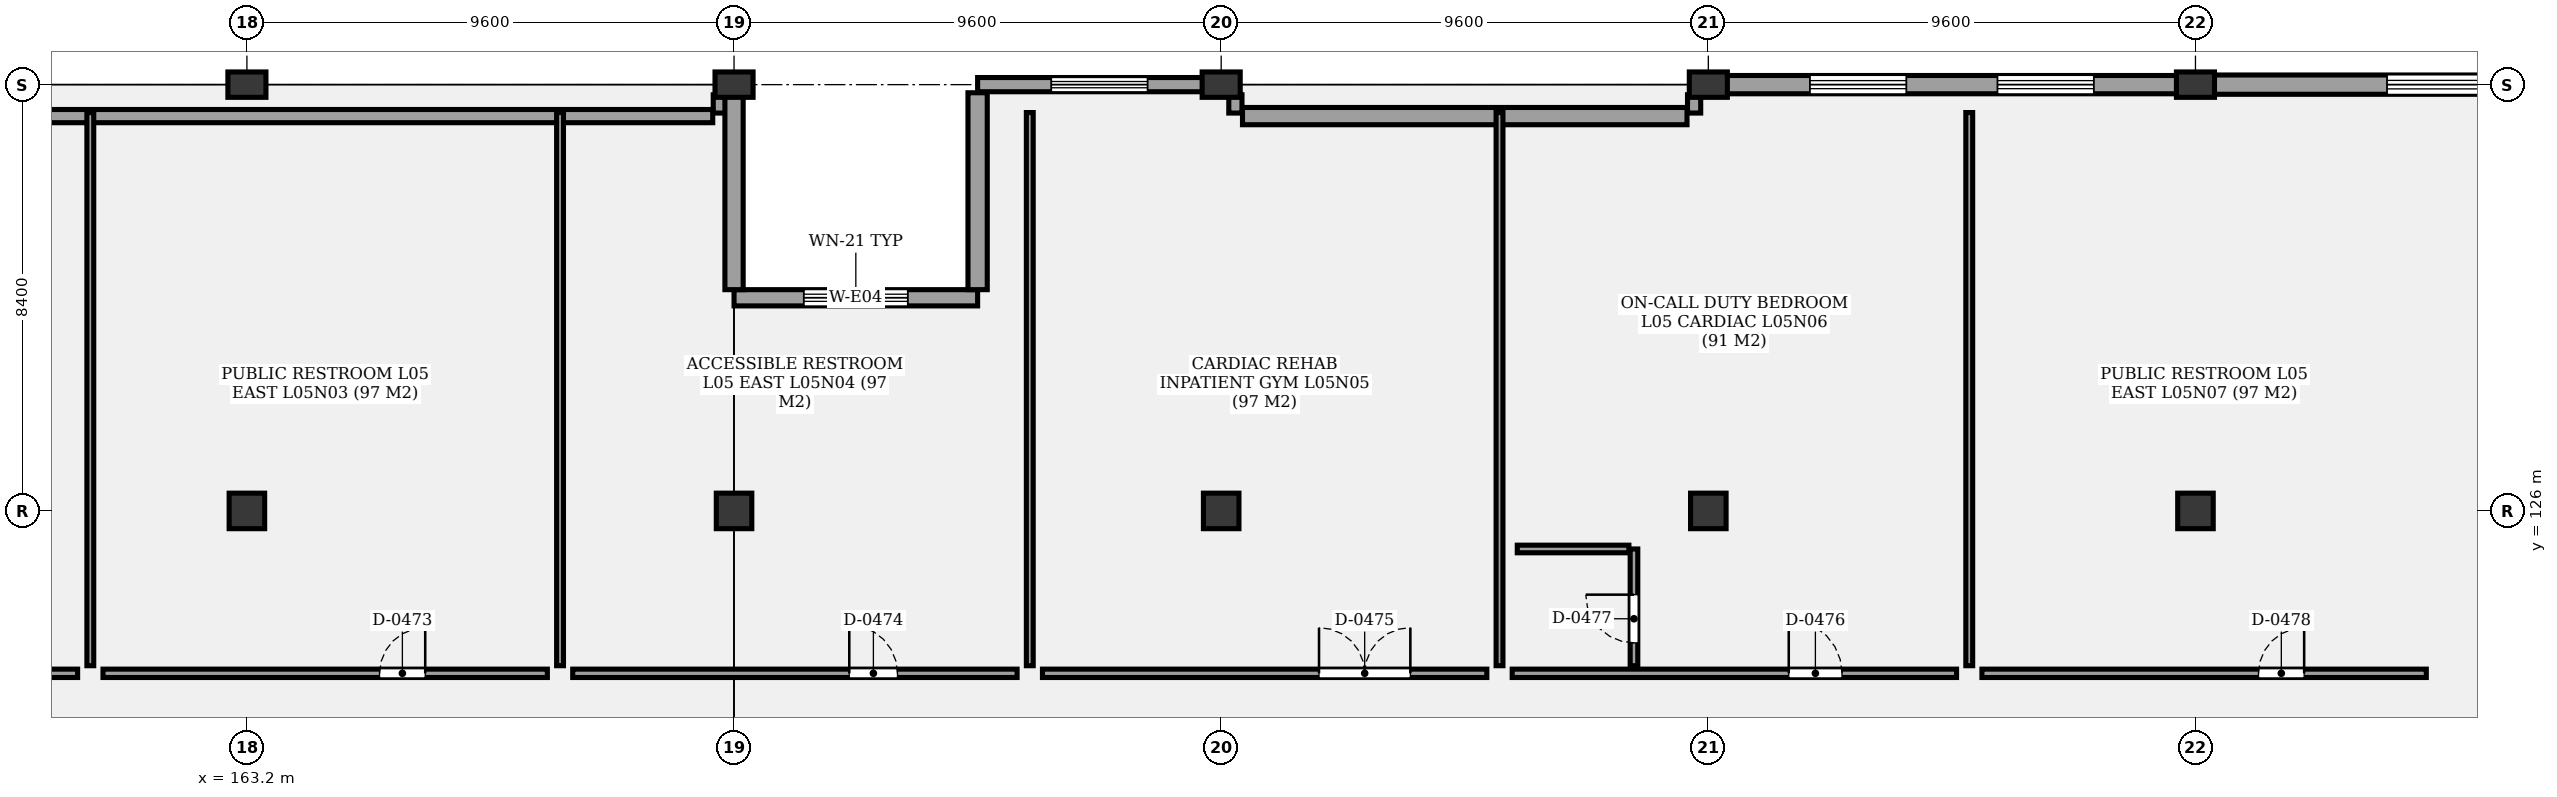
"""IFC4 building model, lengths in metres.
Left out: names, types, materials, properties, quantities, classifications, styles, units other than length and angle.
Written with IfcOpenShell. Run it as: python <this file> out.ifc"""

import sys

from ifc_helpers import new_model, si_unit, direction, frame, frame_2d, origin, origin_2d, place, context, subcontext, project, spatial, rectangle, extrude, element, fill, save


model = new_model("IFC4")
c1 = context("Model", 3, precision=1e-05, world=origin(), true_north=direction((0.0, 1.0)))
c2 = subcontext(c1, "Body", "Model", "MODEL_VIEW")
j1 = project(units=[si_unit("LENGTHUNIT", "METRE"), si_unit("PLANEANGLEUNIT", "RADIAN")], contexts=[c1])
p1 = place(None, origin())
s1 = spatial("IfcSite", under=j1, at=p1, CompositionType="ELEMENT")
p2 = place(p1, origin())
s2 = spatial("IfcBuilding", under=s1, at=p2, CompositionType="ELEMENT")
p3 = place(p2, frame((0.0, 0.0, 22.0)))
s3 = spatial("IfcBuildingStorey", under=s2, at=p3, CompositionType="ELEMENT", Elevation=22.0)
p4 = place(p3, frame((163.2, 126.0, 0.0), z_axis=(0.0, 0.0, 1.0), x_axis=(1.0, 0.0, 0.0)))
e1 = element("IfcColumn", 1, at=p4, inside=s3, PredefinedType="COLUMN", context=c2, shape_type="SweptSolid", body=[
    extrude(rectangle(XDim=0.7, YDim=0.7, at=origin_2d()), origin(), (0.0, 0.0, 1.0), 4.2),
])
p5 = place(p3, frame((163.2, 134.4, 0.0), z_axis=(0.0, 0.0, 1.0), x_axis=(1.0, 0.0, 0.0)))
e2 = element("IfcColumn", 2, at=p5, inside=s3, PredefinedType="COLUMN", context=c2, shape_type="SweptSolid", body=[
    extrude(rectangle(XDim=0.75, YDim=0.5, at=origin_2d()), origin(), (0.0, 0.0, 1.0), 4.2),
])
p6 = place(p3, frame((172.8, 126.0, 0.0), z_axis=(0.0, 0.0, 1.0), x_axis=(1.0, 0.0, 0.0)))
e3 = element("IfcColumn", 3, at=p6, inside=s3, PredefinedType="COLUMN", context=c2, shape_type="SweptSolid", body=[
    extrude(rectangle(XDim=0.7, YDim=0.7, at=origin_2d()), origin(), (0.0, 0.0, 1.0), 4.2),
])
p7 = place(p3, frame((172.8, 134.4, 0.0), z_axis=(0.0, 0.0, 1.0), x_axis=(1.0, 0.0, 0.0)))
e4 = element("IfcColumn", 4, at=p7, inside=s3, PredefinedType="COLUMN", context=c2, shape_type="SweptSolid", body=[
    extrude(rectangle(XDim=0.75, YDim=0.5, at=origin_2d()), origin(), (0.0, 0.0, 1.0), 4.2),
])
p8 = place(p3, frame((182.4, 126.0, 0.0), z_axis=(0.0, 0.0, 1.0), x_axis=(1.0, 0.0, 0.0)))
e5 = element("IfcColumn", 5, at=p8, inside=s3, PredefinedType="COLUMN", context=c2, shape_type="SweptSolid", body=[
    extrude(rectangle(XDim=0.7, YDim=0.7, at=origin_2d()), origin(), (0.0, 0.0, 1.0), 4.2),
])
p9 = place(p3, frame((182.4, 134.4, 0.0), z_axis=(0.0, 0.0, 1.0), x_axis=(1.0, 0.0, 0.0)))
e6 = element("IfcColumn", 6, at=p9, inside=s3, PredefinedType="COLUMN", context=c2, shape_type="SweptSolid", body=[
    extrude(rectangle(XDim=0.75, YDim=0.5, at=origin_2d()), origin(), (0.0, 0.0, 1.0), 4.2),
])
p10 = place(p3, frame((192.0, 126.0, 0.0), z_axis=(0.0, 0.0, 1.0), x_axis=(1.0, 0.0, 0.0)))
e7 = element("IfcColumn", 7, at=p10, inside=s3, PredefinedType="COLUMN", context=c2, shape_type="SweptSolid", body=[
    extrude(rectangle(XDim=0.7, YDim=0.7, at=origin_2d()), origin(), (0.0, 0.0, 1.0), 4.2),
])
p11 = place(p3, frame((192.0, 134.4, 0.0), z_axis=(0.0, 0.0, 1.0), x_axis=(1.0, 0.0, 0.0)))
e8 = element("IfcColumn", 8, at=p11, inside=s3, PredefinedType="COLUMN", context=c2, shape_type="SweptSolid", body=[
    extrude(rectangle(XDim=0.75, YDim=0.5, at=origin_2d()), origin(), (0.0, 0.0, 1.0), 4.2),
])
p12 = place(p3, frame((201.6, 126.0, 0.0), z_axis=(0.0, 0.0, 1.0), x_axis=(1.0, 0.0, 0.0)))
e9 = element("IfcColumn", 9, at=p12, inside=s3, PredefinedType="COLUMN", context=c2, shape_type="SweptSolid", body=[
    extrude(rectangle(XDim=0.7, YDim=0.7, at=origin_2d()), origin(), (0.0, 0.0, 1.0), 4.2),
])
p13 = place(p3, frame((201.6, 134.4, 0.0), z_axis=(0.0, 0.0, 1.0), x_axis=(1.0, 0.0, 0.0)))
e10 = element("IfcColumn", 10, at=p13, inside=s3, PredefinedType="COLUMN", context=c2, shape_type="SweptSolid", body=[
    extrude(rectangle(XDim=0.75, YDim=0.5, at=origin_2d()), origin(), (0.0, 0.0, 1.0), 4.2),
])
p14 = place(p3, frame((172.8, 130.2, 0.0), z_axis=(0.0, 0.0, 1.0), x_axis=(1.0, 0.0, 0.0)))
e11 = element("IfcWall", 11, at=p14, inside=s3, PredefinedType="SOLIDWALL", context=c2, shape_type="SweptSolid", body=[
    extrude(rectangle(XDim=4.8, YDim=0.32, at=frame_2d((2.4, 0.0))), origin(), (0.0, 0.0, 1.0), 3.39),
])
p15 = place(p14, frame((1.375, 0.0, 0.85)))
e12 = element("IfcOpeningElement", 12, at=p15, cuts=e11, PredefinedType="OPENING", context=c2, shape_type="SweptSolid", body=[
    extrude(rectangle(XDim=2.05, YDim=1.4, at=frame_2d((1.025, 0.7))), frame((0.0, 0.17, 0.0), z_axis=(0.0, -1.0, 0.0), x_axis=(1.0, 0.0, 0.0)), (0.0, 0.0, 1.0), 0.34),
])
p16 = place(p3, frame((172.52, 134.2, 0.0), z_axis=(0.0, 0.0, 1.0), x_axis=(0.0, -1.0, 0.0)))
e13 = element("IfcWall", 13, at=p16, inside=s3, PredefinedType="SOLIDWALL", context=c2, shape_type="SweptSolid", body=[
    extrude(rectangle(XDim=0.36, YDim=0.26, at=frame_2d((0.18, 0.0))), origin(), (0.0, 0.0, 1.0), 3.39),
])
p17 = place(p3, frame((154.02, 133.78, 0.0), z_axis=(0.0, 0.0, 1.0), x_axis=(1.0, 0.0, 0.0)))
e14 = element("IfcWall", 14, at=p17, inside=s3, PredefinedType="SOLIDWALL", context=c2, shape_type="SweptSolid", body=[
    extrude(rectangle(XDim=18.36, YDim=0.26, at=frame_2d((9.18, 0.0))), origin(), (0.0, 0.0, 1.0), 3.39),
])
p18 = place(p3, frame((177.6, 134.4, 0.0), z_axis=(0.0, 0.0, 1.0), x_axis=(1.0, 0.0, 0.0)))
e15 = element("IfcWall", 15, at=p18, inside=s3, PredefinedType="SOLIDWALL", context=c2, shape_type="SweptSolid", body=[
    extrude(rectangle(XDim=4.8, YDim=0.28, at=frame_2d((2.4, 0.0))), origin(), (0.0, 0.0, 1.0), 3.39),
])
p19 = place(p18, frame((1.45, 0.0, 0.85)))
e16 = element("IfcOpeningElement", 16, at=p19, cuts=e15, PredefinedType="OPENING", context=c2, shape_type="SweptSolid", body=[
    extrude(rectangle(XDim=1.9, YDim=1.4, at=frame_2d((0.95, 0.7))), frame((0.0, 0.15, 0.0), z_axis=(0.0, -1.0, 0.0), x_axis=(1.0, 0.0, 0.0)), (0.0, 0.0, 1.0), 0.3),
])
for number, where, z_axis, x_axis in (
    (17, (182.68, 134.2, 0.0), (0.0, 0.0, 1.0), (0.0, -1.0, 0.0)),
    (18, (191.72, 134.2, 0.0), (0.0, 0.0, 1.0), (0.0, -1.0, 0.0)),
):
    element("IfcWall", number, at=place(p3, frame(where, z_axis=z_axis, x_axis=x_axis)), inside=s3, PredefinedType="SOLIDWALL", context=c2, shape_type="SweptSolid", body=[
        extrude(rectangle(XDim=0.36, YDim=0.26, at=frame_2d((0.18, 0.0))), origin(), (0.0, 0.0, 1.0), 3.39),
    ])
p20 = place(p3, frame((182.82, 133.78, 0.0), z_axis=(0.0, 0.0, 1.0), x_axis=(1.0, 0.0, 0.0)))
e19 = element("IfcWall", 19, at=p20, inside=s3, PredefinedType="SOLIDWALL", context=c2, shape_type="SweptSolid", body=[
    extrude(rectangle(XDim=8.76, YDim=0.34, at=frame_2d((4.38, 0.0))), origin(), (0.0, 0.0, 1.0), 3.39),
])
p21 = place(p3, frame((192.0, 134.4, 0.0), z_axis=(0.0, 0.0, 1.0), x_axis=(1.0, 0.0, 0.0)))
e20 = element("IfcWall", 20, at=p21, inside=s3, PredefinedType="SOLIDWALL", context=c2, shape_type="SweptSolid", body=[
    extrude(rectangle(XDim=9.6, YDim=0.36, at=frame_2d((4.8, 0.0))), origin(), (0.0, 0.0, 1.0), 3.39),
])
p22 = place(p21, frame((2.002, 0.0, 0.85)))
e21 = element("IfcOpeningElement", 21, at=p22, cuts=e20, PredefinedType="OPENING", context=c2, shape_type="SweptSolid", body=[
    extrude(rectangle(XDim=1.9, YDim=1.4, at=frame_2d((0.95, 0.7))), frame((0.0, 0.19, 0.0), z_axis=(0.0, -1.0, 0.0), x_axis=(1.0, 0.0, 0.0)), (0.0, 0.0, 1.0), 0.38),
])
p23 = place(p21, frame((5.698, 0.0, 0.85)))
e22 = element("IfcOpeningElement", 22, at=p23, cuts=e20, PredefinedType="OPENING", context=c2, shape_type="SweptSolid", body=[
    extrude(rectangle(XDim=1.9, YDim=1.4, at=frame_2d((0.95, 0.7))), frame((0.0, 0.19, 0.0), z_axis=(0.0, -1.0, 0.0), x_axis=(1.0, 0.0, 0.0)), (0.0, 0.0, 1.0), 0.38),
])
p24 = place(p3, frame((201.6, 134.4, 0.0), z_axis=(0.0, 0.0, 1.0), x_axis=(1.0, 0.0, 0.0)))
e23 = element("IfcWall", 23, at=p24, inside=s3, PredefinedType="SOLIDWALL", context=c2, shape_type="SweptSolid", body=[
    extrude(rectangle(XDim=9.6, YDim=0.38, at=frame_2d((4.8, 0.0))), origin(), (0.0, 0.0, 1.0), 3.39),
])
p25 = place(p24, frame((3.775, 0.0, 0.85)))
e24 = element("IfcOpeningElement", 24, at=p25, cuts=e23, PredefinedType="OPENING", context=c2, shape_type="SweptSolid", body=[
    extrude(rectangle(XDim=2.05, YDim=1.4, at=frame_2d((1.025, 0.7))), frame((0.0, 0.2, 0.0), z_axis=(0.0, -1.0, 0.0), x_axis=(1.0, 0.0, 0.0)), (0.0, 0.0, 1.0), 0.4),
])
p26 = place(p3, frame((172.8, 134.24, 0.0), z_axis=(0.0, 0.0, 1.0), x_axis=(0.0, -1.0, 0.0)))
e25 = element("IfcWall", 25, at=p26, inside=s3, PredefinedType="SOLIDWALL", context=c2, shape_type="SweptSolid", body=[
    extrude(rectangle(XDim=3.88, YDim=0.36, at=frame_2d((1.94, 0.0))), origin(), (0.0, 0.0, 1.0), 3.39),
])
p27 = place(p3, frame((177.6, 130.36, 0.0), z_axis=(0.0, 0.0, 1.0), x_axis=(0.0, 1.0, 0.0)))
e26 = element("IfcWall", 26, at=p27, inside=s3, PredefinedType="SOLIDWALL", context=c2, shape_type="SweptSolid", body=[
    extrude(rectangle(XDim=3.88, YDim=0.38, at=frame_2d((1.94, 0.0))), origin(), (0.0, 0.0, 1.0), 3.39),
])
p28 = place(p3, frame((151.107, 122.8, 0.0), z_axis=(0.0, 0.0, 1.0), x_axis=(1.0, 0.0, 0.0)))
e27 = element("IfcWall", 27, at=p28, inside=s3, PredefinedType="PARTITIONING", context=c2, shape_type="SweptSolid", body=[
    extrude(rectangle(XDim=8.757, YDim=0.165, at=frame_2d((4.378, 0.0))), origin(), (0.0, 0.0, 1.0), 3.3),
])
p29 = place(p28, frame((5.45, 0.0, 0.0)))
e28 = element("IfcOpeningElement", 28, at=p29, cuts=e27, PredefinedType="OPENING", context=c2, shape_type="SweptSolid", body=[
    extrude(rectangle(XDim=1.05, YDim=2.2, at=frame_2d((0.525, 1.1))), frame((0.0, 0.093, 0.0), z_axis=(0.0, -1.0, 0.0), x_axis=(1.0, 0.0, 0.0)), (0.0, 0.0, 1.0), 0.185),
])
p30 = place(p3, frame((160.364, 122.8, 0.0), z_axis=(0.0, 0.0, 1.0), x_axis=(1.0, 0.0, 0.0)))
e29 = element("IfcWall", 29, at=p30, inside=s3, PredefinedType="PARTITIONING", context=c2, shape_type="SweptSolid", body=[
    extrude(rectangle(XDim=8.757, YDim=0.165, at=frame_2d((4.378, 0.0))), origin(), (0.0, 0.0, 1.0), 3.3),
])
p31 = place(p30, frame((5.45, 0.0, 0.0)))
e30 = element("IfcOpeningElement", 30, at=p31, cuts=e29, PredefinedType="OPENING", context=c2, shape_type="SweptSolid", body=[
    extrude(rectangle(XDim=0.9, YDim=2.1, at=frame_2d((0.45, 1.05))), frame((0.0, 0.093, 0.0), z_axis=(0.0, -1.0, 0.0), x_axis=(1.0, 0.0, 0.0)), (0.0, 0.0, 1.0), 0.185),
])
p32 = place(p3, frame((160.114, 122.95, 0.0), z_axis=(0.0, 0.0, 1.0), x_axis=(0.0, 1.0, 0.0)))
e31 = element("IfcWall", 31, at=p32, inside=s3, PredefinedType="PARTITIONING", context=c2, shape_type="SweptSolid", body=[
    extrude(rectangle(XDim=10.9, YDim=0.135, at=frame_2d((5.45, 0.0))), origin(), (0.0, 0.0, 1.0), 3.3),
])
p33 = place(p3, frame((169.621, 122.8, 0.0), z_axis=(0.0, 0.0, 1.0), x_axis=(1.0, 0.0, 0.0)))
e32 = element("IfcWall", 32, at=p33, inside=s3, PredefinedType="PARTITIONING", context=c2, shape_type="SweptSolid", body=[
    extrude(rectangle(XDim=8.757, YDim=0.165, at=frame_2d((4.378, 0.0))), origin(), (0.0, 0.0, 1.0), 3.3),
])
p34 = place(p33, frame((5.45, 0.0, 0.0)))
e33 = element("IfcOpeningElement", 33, at=p34, cuts=e32, PredefinedType="OPENING", context=c2, shape_type="SweptSolid", body=[
    extrude(rectangle(XDim=0.95, YDim=2.1, at=frame_2d((0.475, 1.05))), frame((0.0, 0.093, 0.0), z_axis=(0.0, -1.0, 0.0), x_axis=(1.0, 0.0, 0.0)), (0.0, 0.0, 1.0), 0.185),
])
p35 = place(p3, frame((169.371, 122.95, 0.0), z_axis=(0.0, 0.0, 1.0), x_axis=(0.0, 1.0, 0.0)))
e34 = element("IfcWall", 34, at=p35, inside=s3, PredefinedType="PARTITIONING", context=c2, shape_type="SweptSolid", body=[
    extrude(rectangle(XDim=10.9, YDim=0.135, at=frame_2d((5.45, 0.0))), origin(), (0.0, 0.0, 1.0), 3.3),
])
p36 = place(p3, frame((178.878, 122.8, 0.0), z_axis=(0.0, 0.0, 1.0), x_axis=(1.0, 0.0, 0.0)))
e35 = element("IfcWall", 35, at=p36, inside=s3, PredefinedType="PARTITIONING", context=c2, shape_type="SweptSolid", body=[
    extrude(rectangle(XDim=8.757, YDim=0.165, at=frame_2d((4.378, 0.0))), origin(), (0.0, 0.0, 1.0), 3.3),
])
p37 = place(p36, frame((5.45, 0.0, 0.0)))
e36 = element("IfcOpeningElement", 36, at=p37, cuts=e35, PredefinedType="OPENING", context=c2, shape_type="SweptSolid", body=[
    extrude(rectangle(XDim=1.8, YDim=2.2, at=frame_2d((0.9, 1.1))), frame((0.0, 0.093, 0.0), z_axis=(0.0, -1.0, 0.0), x_axis=(1.0, 0.0, 0.0)), (0.0, 0.0, 1.0), 0.185),
])
p38 = place(p3, frame((178.628, 122.95, 0.0), z_axis=(0.0, 0.0, 1.0), x_axis=(0.0, 1.0, 0.0)))
e37 = element("IfcWall", 37, at=p38, inside=s3, PredefinedType="PARTITIONING", context=c2, shape_type="SweptSolid", body=[
    extrude(rectangle(XDim=10.9, YDim=0.135, at=frame_2d((5.45, 0.0))), origin(), (0.0, 0.0, 1.0), 3.3),
])
p39 = place(p3, frame((188.135, 122.8, 0.0), z_axis=(0.0, 0.0, 1.0), x_axis=(1.0, 0.0, 0.0)))
e38 = element("IfcWall", 38, at=p39, inside=s3, PredefinedType="PARTITIONING", context=c2, shape_type="SweptSolid", body=[
    extrude(rectangle(XDim=8.757, YDim=0.165, at=frame_2d((4.378, 0.0))), origin(), (0.0, 0.0, 1.0), 3.3),
])
p40 = place(p39, frame((5.45, 0.0, 0.0)))
e39 = element("IfcOpeningElement", 39, at=p40, cuts=e38, PredefinedType="OPENING", context=c2, shape_type="SweptSolid", body=[
    extrude(rectangle(XDim=1.05, YDim=2.2, at=frame_2d((0.525, 1.1))), frame((0.0, 0.093, 0.0), z_axis=(0.0, -1.0, 0.0), x_axis=(1.0, 0.0, 0.0)), (0.0, 0.0, 1.0), 0.185),
])
p41 = place(p3, frame((190.535, 122.95, 0.0), z_axis=(0.0, 0.0, 1.0), x_axis=(0.0, 1.0, 0.0)))
e40 = element("IfcWall", 40, at=p41, inside=s3, PredefinedType="PARTITIONING", context=c2, shape_type="SweptSolid", body=[
    extrude(rectangle(XDim=2.3, YDim=0.15, at=frame_2d((1.15, 0.0))), origin(), (0.0, 0.0, 1.0), 3.3),
])
p42 = place(p41, frame((0.45, 0.0, 0.0)))
e41 = element("IfcOpeningElement", 41, at=p42, cuts=e40, PredefinedType="OPENING", context=c2, shape_type="SweptSolid", body=[
    extrude(rectangle(XDim=0.95, YDim=2.1, at=frame_2d((0.475, 1.05))), frame((0.0, 0.085, 0.0), z_axis=(0.0, -1.0, 0.0), x_axis=(1.0, 0.0, 0.0)), (0.0, 0.0, 1.0), 0.17),
])
p43 = place(p3, frame((188.235, 125.25, 0.0), z_axis=(0.0, 0.0, 1.0), x_axis=(1.0, 0.0, 0.0)))
e42 = element("IfcWall", 42, at=p43, inside=s3, PredefinedType="PARTITIONING", context=c2, shape_type="SweptSolid", body=[
    extrude(rectangle(XDim=2.2, YDim=0.15, at=frame_2d((1.1, 0.0))), origin(), (0.0, 0.0, 1.0), 3.3),
])
p44 = place(p3, frame((187.885, 122.95, 0.0), z_axis=(0.0, 0.0, 1.0), x_axis=(0.0, 1.0, 0.0)))
e43 = element("IfcWall", 43, at=p44, inside=s3, PredefinedType="PARTITIONING", context=c2, shape_type="SweptSolid", body=[
    extrude(rectangle(XDim=10.9, YDim=0.135, at=frame_2d((5.45, 0.0))), origin(), (0.0, 0.0, 1.0), 3.3),
])
p45 = place(p3, frame((197.392, 122.8, 0.0), z_axis=(0.0, 0.0, 1.0), x_axis=(1.0, 0.0, 0.0)))
e44 = element("IfcWall", 44, at=p45, inside=s3, PredefinedType="PARTITIONING", context=c2, shape_type="SweptSolid", body=[
    extrude(rectangle(XDim=8.757, YDim=0.165, at=frame_2d((4.378, 0.0))), origin(), (0.0, 0.0, 1.0), 3.3),
])
p46 = place(p45, frame((5.45, 0.0, 0.0)))
e45 = element("IfcOpeningElement", 45, at=p46, cuts=e44, PredefinedType="OPENING", context=c2, shape_type="SweptSolid", body=[
    extrude(rectangle(XDim=0.9, YDim=2.1, at=frame_2d((0.45, 1.05))), frame((0.0, 0.093, 0.0), z_axis=(0.0, -1.0, 0.0), x_axis=(1.0, 0.0, 0.0)), (0.0, 0.0, 1.0), 0.185),
])
p47 = place(p3, frame((197.142, 122.95, 0.0), z_axis=(0.0, 0.0, 1.0), x_axis=(0.0, 1.0, 0.0)))
e46 = element("IfcWall", 46, at=p47, inside=s3, PredefinedType="PARTITIONING", context=c2, shape_type="SweptSolid", body=[
    extrude(rectangle(XDim=10.9, YDim=0.135, at=frame_2d((5.45, 0.0))), origin(), (0.0, 0.0, 1.0), 3.3),
])
p48 = place(p15, origin())
e47 = element("IfcWindow", 47, at=p48, inside=s3, PartitioningType="SINGLE_PANEL", PredefinedType="WINDOW", context=c2, shape_type="SweptSolid", body=[
    extrude(rectangle(XDim=2.05, YDim=1.4, at=frame_2d((1.025, 0.7))), frame((0.0, 0.03, 0.0), z_axis=(0.0, -1.0, 0.0), x_axis=(1.0, 0.0, 0.0)), (0.0, 0.0, 1.0), 0.06),
])
fill(e12, e47)
p49 = place(p19, origin())
e48 = element("IfcWindow", 48, at=p49, inside=s3, PartitioningType="SINGLE_PANEL", PredefinedType="WINDOW", context=c2, shape_type="SweptSolid", body=[
    extrude(rectangle(XDim=1.9, YDim=1.4, at=frame_2d((0.95, 0.7))), frame((0.0, 0.03, 0.0), z_axis=(0.0, -1.0, 0.0), x_axis=(1.0, 0.0, 0.0)), (0.0, 0.0, 1.0), 0.06),
])
fill(e16, e48)
p50 = place(p22, origin())
e49 = element("IfcWindow", 49, at=p50, inside=s3, PartitioningType="SINGLE_PANEL", PredefinedType="WINDOW", context=c2, shape_type="SweptSolid", body=[
    extrude(rectangle(XDim=1.9, YDim=1.4, at=frame_2d((0.95, 0.7))), frame((0.0, 0.03, 0.0), z_axis=(0.0, -1.0, 0.0), x_axis=(1.0, 0.0, 0.0)), (0.0, 0.0, 1.0), 0.06),
])
fill(e21, e49)
p51 = place(p23, origin())
e50 = element("IfcWindow", 50, at=p51, inside=s3, PartitioningType="SINGLE_PANEL", PredefinedType="WINDOW", context=c2, shape_type="SweptSolid", body=[
    extrude(rectangle(XDim=1.9, YDim=1.4, at=frame_2d((0.95, 0.7))), frame((0.0, 0.03, 0.0), z_axis=(0.0, -1.0, 0.0), x_axis=(1.0, 0.0, 0.0)), (0.0, 0.0, 1.0), 0.06),
])
fill(e22, e50)
p52 = place(p25, origin())
e51 = element("IfcWindow", 51, at=p52, inside=s3, PartitioningType="SINGLE_PANEL", PredefinedType="WINDOW", context=c2, shape_type="SweptSolid", body=[
    extrude(rectangle(XDim=2.05, YDim=1.4, at=frame_2d((1.025, 0.7))), frame((0.0, 0.03, 0.0), z_axis=(0.0, -1.0, 0.0), x_axis=(1.0, 0.0, 0.0)), (0.0, 0.0, 1.0), 0.06),
])
fill(e24, e51)
p53 = place(p31, origin())
e52 = element("IfcDoor", 52, at=p53, inside=s3, OperationType="SINGLE_SWING_RIGHT", PredefinedType="DOOR", context=c2, shape_type="SweptSolid", body=[
    extrude(rectangle(XDim=0.9, YDim=2.1, at=frame_2d((0.45, 1.05))), frame((0.0, 0.025, 0.0), z_axis=(0.0, -1.0, 0.0), x_axis=(1.0, 0.0, 0.0)), (0.0, 0.0, 1.0), 0.05),
])
fill(e30, e52)
p54 = place(p34, origin())
e53 = element("IfcDoor", 53, at=p54, inside=s3, OperationType="SINGLE_SWING_LEFT", PredefinedType="DOOR", context=c2, shape_type="SweptSolid", body=[
    extrude(rectangle(XDim=0.95, YDim=2.1, at=frame_2d((0.475, 1.05))), frame((0.0, 0.025, 0.0), z_axis=(0.0, -1.0, 0.0), x_axis=(1.0, 0.0, 0.0)), (0.0, 0.0, 1.0), 0.05),
])
fill(e33, e53)
p55 = place(p37, origin())
e54 = element("IfcDoor", 54, at=p55, inside=s3, OperationType="DOUBLE_DOOR_SINGLE_SWING", PredefinedType="DOOR", context=c2, shape_type="SweptSolid", body=[
    extrude(rectangle(XDim=1.8, YDim=2.2, at=frame_2d((0.9, 1.1))), frame((0.0, 0.025, 0.0), z_axis=(0.0, -1.0, 0.0), x_axis=(1.0, 0.0, 0.0)), (0.0, 0.0, 1.0), 0.05),
])
fill(e36, e54)
p56 = place(p40, origin())
e55 = element("IfcDoor", 55, at=p56, inside=s3, OperationType="SINGLE_SWING_LEFT", PredefinedType="DOOR", context=c2, shape_type="SweptSolid", body=[
    extrude(rectangle(XDim=1.05, YDim=2.2, at=frame_2d((0.525, 1.1))), frame((0.0, 0.025, 0.0), z_axis=(0.0, -1.0, 0.0), x_axis=(1.0, 0.0, 0.0)), (0.0, 0.0, 1.0), 0.05),
])
fill(e39, e55)
p57 = place(p42, origin())
e56 = element("IfcDoor", 56, at=p57, inside=s3, OperationType="SINGLE_SWING_RIGHT", PredefinedType="DOOR", context=c2, shape_type="SweptSolid", body=[
    extrude(rectangle(XDim=0.95, YDim=2.1, at=frame_2d((0.475, 1.05))), frame((0.0, 0.025, 0.0), z_axis=(0.0, -1.0, 0.0), x_axis=(1.0, 0.0, 0.0)), (0.0, 0.0, 1.0), 0.05),
])
fill(e41, e56)
p58 = place(p46, origin())
e57 = element("IfcDoor", 57, at=p58, inside=s3, OperationType="SINGLE_SWING_RIGHT", PredefinedType="DOOR", context=c2, shape_type="SweptSolid", body=[
    extrude(rectangle(XDim=0.9, YDim=2.1, at=frame_2d((0.45, 1.05))), frame((0.0, 0.025, 0.0), z_axis=(0.0, -1.0, 0.0), x_axis=(1.0, 0.0, 0.0)), (0.0, 0.0, 1.0), 0.05),
])
fill(e45, e57)
save(model, sys.argv[1])
